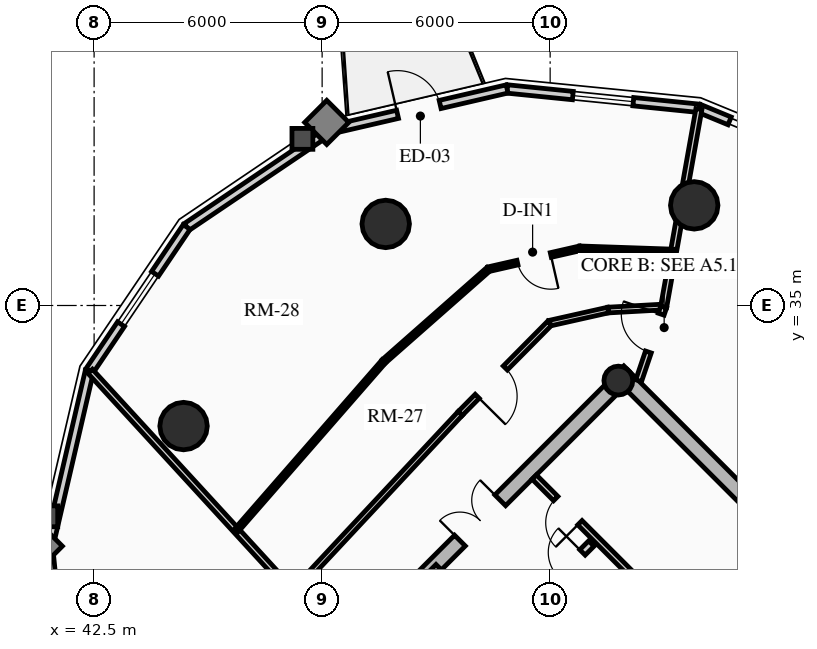
"""IFC4 building model, lengths in metres.
Left out: names, types, materials, properties, quantities, classifications, styles, units other than length and angle.
Written with IfcOpenShell. Run it as: python <this file> out.ifc"""

import sys

from ifc_helpers import new_model, si_unit, direction, frame, frame_2d, origin, origin_2d, place, context, subcontext, project, spatial, rectangle, circle, hollow_circle, extrude, source, transform, mapped, element, fill, save


model = new_model("IFC4")
c1 = context("Model", 3, precision=1e-05, world=origin(), true_north=direction((0.0, 1.0)))
c2 = subcontext(c1, "Body", "Model", "MODEL_VIEW")
j1 = project(units=[si_unit("LENGTHUNIT", "METRE"), si_unit("PLANEANGLEUNIT", "RADIAN")], contexts=[c1])
p1 = place(None, origin())
s1 = spatial("IfcSite", under=j1, at=p1, CompositionType="ELEMENT")
p2 = place(p1, origin())
s2 = spatial("IfcBuilding", under=s1, at=p2, CompositionType="ELEMENT")
p3 = place(p2, frame((0.0, 0.0, 160.33)))
s3 = spatial("IfcBuildingStorey", under=s2, at=p3, CompositionType="ELEMENT", Elevation=160.33)
p4 = place(p3, frame((66.268, 23.298, 0.0), z_axis=(0.0, 0.0, 1.0), x_axis=(-0.707106781187, 0.707106781187, 0.0)))
e1 = element("IfcWall", 1, at=p4, inside=s3, PredefinedType="SHEAR", context=c2, shape_type="SweptSolid", body=[
    extrude(rectangle(XDim=14.1, YDim=0.4, at=frame_2d((7.05, 0.0))), origin(), (0.0, 0.0, 1.0), 2.91),
])
p5 = place(p3, frame((48.873, 25.561, 0.0), z_axis=(0.0, 0.0, 1.0), x_axis=(0.707106781187, 0.707106781187, 0.0)))
e2 = element("IfcWall", 2, at=p5, inside=s3, PredefinedType="SHEAR", context=c2, shape_type="SweptSolid", body=[
    extrude(rectangle(XDim=10.7, YDim=0.4, at=frame_2d((5.35, 0.0))), origin(), (0.0, 0.0, 1.0), 2.91),
])
m1 = source(origin(), c2, "Body", "SweptSolid", [
    extrude(rectangle(XDim=1.5, YDim=2.02, at=frame_2d((0.75, 1.01))), frame((0.0, 0.21, 0.0), z_axis=(0.0, -1.0, 0.0), x_axis=(1.0, 0.0, 0.0)), (0.0, 0.0, 1.0), 0.42),
])
p6 = place(p5, frame((4.6, 0.0, 0.0)))
e3 = element("IfcOpeningElement", 3, at=p6, cuts=e2, PredefinedType="OPENING", context=c2, shape_type="MappedRepresentation", body=[
    mapped(m1, transform((0.0, 0.0, 0.0), x_axis=(1.0, 0.0, 0.0), y_axis=(0.0, 1.0, 0.0), z_axis=(0.0, 0.0, 1.0), scale=1.0)),
])
p7 = place(p3, frame((61.06, 18.373, 0.0), z_axis=(0.0, 0.0, 1.0), x_axis=(-0.707106781187, 0.707106781187, 0.0)))
e4 = element("IfcWall", 4, at=p7, inside=s3, PredefinedType="SHEAR", context=c2, shape_type="SweptSolid", body=[
    extrude(rectangle(XDim=13.7, YDim=0.35, at=frame_2d((6.85, 0.0))), origin(), (0.0, 0.0, 1.0), 2.91),
])
m2 = source(origin(), c2, "Body", "SweptSolid", [
    extrude(rectangle(XDim=1.1, YDim=2.015, at=frame_2d((0.55, 1.007))), frame((0.0, 0.185, 0.0), z_axis=(0.0, -1.0, 0.0), x_axis=(1.0, 0.0, 0.0)), (0.0, 0.0, 1.0), 0.37),
])
p8 = place(p7, frame((4.85, 0.0, 0.0)))
e5 = element("IfcOpeningElement", 5, at=p8, cuts=e4, PredefinedType="OPENING", context=c2, shape_type="MappedRepresentation", body=[
    mapped(m2, transform((0.0, 0.0, 0.0), x_axis=(1.0, 0.0, 0.0), y_axis=(0.0, 1.0, 0.0), z_axis=(0.0, 0.0, 1.0), scale=1.0)),
])
p9 = place(p7, frame((0.625, 0.0, 0.0)))
e6 = element("IfcOpeningElement", 6, at=p9, cuts=e4, PredefinedType="OPENING", context=c2, shape_type="MappedRepresentation", body=[
    mapped(m2, transform((0.0, 0.0, 0.0), x_axis=(1.0, 0.0, 0.0), y_axis=(0.0, 1.0, 0.0), z_axis=(0.0, 0.0, 1.0), scale=1.0)),
])
p10 = place(p7, frame((2.625, 0.0, 0.0)))
e7 = element("IfcOpeningElement", 7, at=p10, cuts=e4, PredefinedType="OPENING", context=c2, shape_type="MappedRepresentation", body=[
    mapped(m2, transform((0.0, 0.0, 0.0), x_axis=(1.0, 0.0, 0.0), y_axis=(0.0, 1.0, 0.0), z_axis=(0.0, 0.0, 1.0), scale=1.0)),
])
m3 = source(origin(), c2, "Body", "SweptSolid", [
    extrude(rectangle(XDim=1.15, YDim=2.02, at=frame_2d((0.575, 1.01))), frame((0.0, 0.185, 0.0), z_axis=(0.0, -1.0, 0.0), x_axis=(1.0, 0.0, 0.0)), (0.0, 0.0, 1.0), 0.37),
])
p11 = place(p7, frame((7.27, 0.0, 0.0)))
e8 = element("IfcOpeningElement", 8, at=p11, cuts=e4, PredefinedType="OPENING", context=c2, shape_type="MappedRepresentation", body=[
    mapped(m3, transform((0.0, 0.0, 0.0), x_axis=(1.0, 0.0, 0.0), y_axis=(0.0, 1.0, 0.0), z_axis=(0.0, 0.0, 1.0), scale=1.0)),
])
p12 = place(p3, frame((58.893, 25.674, 0.0), z_axis=(0.0, 0.0, 1.0), x_axis=(0.707106781187, 0.707106781187, 0.0)))
e9 = element("IfcWall", 9, at=p12, inside=s3, PredefinedType="SHEAR", context=c2, shape_type="SweptSolid", body=[
    extrude(rectangle(XDim=3.285, YDim=0.35, at=frame_2d((1.643, 0.0))), origin(), (0.0, 0.0, 1.0), 2.91),
])
p13 = place(p3, frame((56.294, 33.024, 0.0), z_axis=(0.0, 0.0, 1.0), x_axis=(0.707106781187, 0.707106781187, 0.0)))
e10 = element("IfcColumn", 10, at=p13, inside=s3, PredefinedType="COLUMN", context=c2, shape_type="SweptSolid", body=[
    extrude(hollow_circle(Radius=0.38, WallThickness=0.032, at=origin_2d()), origin(), (0.0, 0.0, 1.0), 2.91),
])
for number, where, z_axis, x_axis in (
    (11, (58.291, 37.635, 0.0), (0.0, 0.0, 1.0), (1.0, 0.0, 0.0)),
    (12, (50.173, 37.146, 0.0), (0.0, 0.0, 1.0), (1.0, 0.0, 0.0)),
    (13, (44.854, 31.827, 0.0), (0.0, 0.0, 1.0), (1.0, 0.0, 0.0)),
):
    element("IfcColumn", number, at=place(p3, frame(where, z_axis=z_axis, x_axis=x_axis)), inside=s3, PredefinedType="USERDEFINED", context=c2, shape_type="SweptSolid", body=[
        extrude(circle(Radius=0.625, at=origin_2d()), origin(), (0.0, 0.0, 1.0), 2.91),
    ])
p14 = place(p3, frame((58.418, 40.189, 0.0), z_axis=(0.0, 0.0, 1.0), x_axis=(0.924556017656, -0.381046152345, 0.0)))
e14 = element("IfcWall", 14, at=p14, inside=s3, PredefinedType="SOLIDWALL", context=c2, shape_type="SweptSolid", body=[
    extrude(rectangle(XDim=0.87, YDim=0.22, at=frame_2d((0.435, 0.0))), origin(), (0.0, 0.0, 1.0), 2.245),
])
p15 = place(p3, frame((53.367, 40.698, 0.0), z_axis=(0.0, 0.0, 1.0), x_axis=(0.994959267396, -0.100279889424, 0.0)))
e15 = element("IfcWall", 15, at=p15, inside=s3, PredefinedType="SOLIDWALL", context=c2, shape_type="SweptSolid", body=[
    extrude(rectangle(XDim=5.076, YDim=0.22, at=frame_2d((2.538, 0.0))), origin(), (0.0, 0.0, 1.0), 2.245),
])
m4 = source(origin(), c2, "Body", "SweptSolid", [
    extrude(rectangle(XDim=1.6, YDim=1.3, at=frame_2d((0.8, 0.65))), frame((0.0, 0.12, 0.0), z_axis=(0.0, -1.0, 0.0), x_axis=(1.0, 0.0, 0.0)), (0.0, 0.0, 1.0), 0.24),
])
p16 = place(p15, frame((1.738, 0.0, 0.65)))
e16 = element("IfcOpeningElement", 16, at=p16, cuts=e15, PredefinedType="OPENING", context=c2, shape_type="MappedRepresentation", body=[
    mapped(m4, transform((0.0, 0.0, 0.0), x_axis=(1.0, 0.0, 0.0), y_axis=(0.0, 1.0, 0.0), z_axis=(0.0, 0.0, 1.0), scale=1.0)),
])
p17 = place(p3, frame((48.721, 39.622, 0.0), z_axis=(0.0, 0.0, 1.0), x_axis=(0.974206226622, 0.225659540039, 0.0)))
e17 = element("IfcWall", 17, at=p17, inside=s3, PredefinedType="SOLIDWALL", context=c2, shape_type="SweptSolid", body=[
    extrude(rectangle(XDim=4.769, YDim=0.22, at=frame_2d((2.385, 0.0))), origin(), (0.0, 0.0, 1.0), 2.245),
])
m5 = source(origin(), c2, "Body", "SweptSolid", [
    extrude(rectangle(XDim=1.15, YDim=2.005, at=frame_2d((0.575, 1.002))), frame((0.0, 0.12, 0.0), z_axis=(0.0, -1.0, 0.0), x_axis=(1.0, 0.0, 0.0)), (0.0, 0.0, 1.0), 0.24),
])
p18 = place(p17, frame((1.81, 0.0, 0.0)))
e18 = element("IfcOpeningElement", 18, at=p18, cuts=e17, PredefinedType="OPENING", context=c2, shape_type="MappedRepresentation", body=[
    mapped(m5, transform((0.0, 0.0, 0.0), x_axis=(1.0, 0.0, 0.0), y_axis=(0.0, 1.0, 0.0), z_axis=(0.0, 0.0, 1.0), scale=1.0)),
])
p19 = place(p3, frame((44.935, 37.065, 0.0), z_axis=(0.0, 0.0, 1.0), x_axis=(0.828739009952, 0.559635286042, 0.0)))
e19 = element("IfcWall", 19, at=p19, inside=s3, PredefinedType="SOLIDWALL", context=c2, shape_type="SweptSolid", body=[
    extrude(rectangle(XDim=4.569, YDim=0.22, at=frame_2d((2.284, 0.0))), origin(), (0.0, 0.0, 1.0), 2.245),
])
p20 = place(p3, frame((42.378, 33.279, 0.0), z_axis=(0.0, 0.0, 1.0), x_axis=(0.559635286042, 0.828739009952, 0.0)))
e20 = element("IfcWall", 20, at=p20, inside=s3, PredefinedType="SOLIDWALL", context=c2, shape_type="SweptSolid", body=[
    extrude(rectangle(XDim=4.569, YDim=0.22, at=frame_2d((2.284, 0.0))), origin(), (0.0, 0.0, 1.0), 2.245),
])
p21 = place(p20, frame((1.484, 0.0, 0.65)))
e21 = element("IfcOpeningElement", 21, at=p21, cuts=e20, PredefinedType="OPENING", context=c2, shape_type="MappedRepresentation", body=[
    mapped(m4, transform((0.0, 0.0, 0.0), x_axis=(1.0, 0.0, 0.0), y_axis=(0.0, 1.0, 0.0), z_axis=(0.0, 0.0, 1.0), scale=1.0)),
])
p22 = place(p3, frame((41.302, 28.633, 0.0), z_axis=(0.0, 0.0, 1.0), x_axis=(0.225659540039, 0.974206226622, 0.0)))
e22 = element("IfcWall", 22, at=p22, inside=s3, PredefinedType="SOLIDWALL", context=c2, shape_type="SweptSolid", body=[
    extrude(rectangle(XDim=4.769, YDim=0.22, at=frame_2d((2.385, 0.0))), origin(), (0.0, 0.0, 1.0), 2.245),
])
p23 = place(p3, frame((41.811, 23.582, 0.0), z_axis=(0.0, 0.0, 1.0), x_axis=(-0.100279889424, 0.994959267396, 0.0)))
e23 = element("IfcWall", 23, at=p23, inside=s3, PredefinedType="SOLIDWALL", context=c2, shape_type="SweptSolid", body=[
    extrude(rectangle(XDim=5.076, YDim=0.22, at=frame_2d((2.538, 0.0))), origin(), (0.0, 0.0, 1.0), 2.245),
])
p24 = place(p23, frame((1.738, 0.0, 0.65)))
e24 = element("IfcOpeningElement", 24, at=p24, cuts=e23, PredefinedType="OPENING", context=c2, shape_type="MappedRepresentation", body=[
    mapped(m4, transform((0.0, 0.0, 0.0), x_axis=(1.0, 0.0, 0.0), y_axis=(0.0, 1.0, 0.0), z_axis=(0.0, 0.0, 1.0), scale=1.0)),
])
p25 = place(p3, frame((53.264, 26.416, 0.0), z_axis=(0.0, 0.0, 1.0), x_axis=(0.707106781187, 0.707106781187, 0.0)))
e25 = element("IfcWall", 25, at=p25, inside=s3, PredefinedType="PARTITIONING", context=c2, shape_type="SweptSolid", body=[
    extrude(rectangle(XDim=3.28, YDim=0.2, at=frame_2d((1.64, 0.0))), origin(), (0.0, 0.0, 1.0), 2.675),
])
m6 = source(origin(), c2, "Body", "SweptSolid", [
    extrude(rectangle(XDim=1.0, YDim=2.015, at=frame_2d((0.5, 1.007))), frame((0.0, 0.11, 0.0), z_axis=(0.0, -1.0, 0.0), x_axis=(1.0, 0.0, 0.0)), (0.0, 0.0, 1.0), 0.22),
])
p26 = place(p25, frame((0.14, 0.0, 0.0)))
e26 = element("IfcOpeningElement", 26, at=p26, cuts=e25, PredefinedType="OPENING", context=c2, shape_type="MappedRepresentation", body=[
    mapped(m6, transform((0.0, 0.0, 0.0), x_axis=(1.0, 0.0, 0.0), y_axis=(0.0, 1.0, 0.0), z_axis=(0.0, 0.0, 1.0), scale=1.0)),
])
m7 = source(origin(), c2, "Body", "SweptSolid", [
    extrude(rectangle(XDim=0.9, YDim=2.005, at=frame_2d((0.45, 1.002))), frame((0.0, 0.11, 0.0), z_axis=(0.0, -1.0, 0.0), x_axis=(1.0, 0.0, 0.0)), (0.0, 0.0, 1.0), 0.22),
])
p27 = place(p25, frame((2.05, 0.0, 0.0)))
e27 = element("IfcOpeningElement", 27, at=p27, cuts=e25, PredefinedType="OPENING", context=c2, shape_type="MappedRepresentation", body=[
    mapped(m7, transform((0.0, 0.0, 0.0), x_axis=(1.0, 0.0, 0.0), y_axis=(0.0, 1.0, 0.0), z_axis=(0.0, 0.0, 1.0), scale=1.0)),
])
p28 = place(p3, frame((56.839, 27.728, 0.0), z_axis=(0.0, 0.0, 1.0), x_axis=(-0.707106781187, 0.707106781187, 0.0)))
e28 = element("IfcWall", 28, at=p28, inside=s3, PredefinedType="PARTITIONING", context=c2, shape_type="SweptSolid", body=[
    extrude(rectangle(XDim=3.9, YDim=0.16, at=frame_2d((1.95, 0.0))), origin(), (0.0, 0.0, 1.0), 2.675),
])
m8 = source(origin(), c2, "Body", "SweptSolid", [
    extrude(rectangle(XDim=0.9, YDim=2.005, at=frame_2d((0.45, 1.002))), frame((0.0, 0.09, 0.0), z_axis=(0.0, -1.0, 0.0), x_axis=(1.0, 0.0, 0.0)), (0.0, 0.0, 1.0), 0.18),
])
p29 = place(p28, frame((2.2, 0.0, 0.0)))
e29 = element("IfcOpeningElement", 29, at=p29, cuts=e28, PredefinedType="OPENING", context=c2, shape_type="MappedRepresentation", body=[
    mapped(m8, transform((0.0, 0.0, 0.0), x_axis=(1.0, 0.0, 0.0), y_axis=(0.0, 1.0, 0.0), z_axis=(0.0, 0.0, 1.0), scale=1.0)),
])
p30 = place(p3, frame((57.486, 34.96, 0.0), z_axis=(0.0, 0.0, 1.0), x_axis=(-0.998483871836, -0.055045051404, 0.0)))
e30 = element("IfcWall", 30, at=p30, inside=s3, PredefinedType="PARTITIONING", context=c2, shape_type="SweptSolid", body=[
    extrude(rectangle(XDim=1.464, YDim=0.15, at=frame_2d((0.732, 0.0))), origin(), (0.0, 0.0, 1.0), 2.245),
])
p31 = place(p3, frame((56.025, 34.88, 0.0), z_axis=(0.0, 0.0, 1.0), x_axis=(-0.975729093394, -0.218981132301, 0.0)))
e31 = element("IfcWall", 31, at=p31, inside=s3, PredefinedType="PARTITIONING", context=c2, shape_type="SweptSolid", body=[
    extrude(rectangle(XDim=1.575, YDim=0.15, at=frame_2d((0.788, 0.0))), origin(), (0.0, 0.0, 1.0), 2.245),
])
p32 = place(p3, frame((54.488, 34.535, 0.0), z_axis=(0.0, 0.0, 1.0), x_axis=(-0.703666289339, -0.710530613871, 0.0)))
e32 = element("IfcWall", 32, at=p32, inside=s3, PredefinedType="PARTITIONING", context=c2, shape_type="SweptSolid", body=[
    extrude(rectangle(XDim=3.343, YDim=0.15, at=frame_2d((1.672, 0.0))), origin(), (0.0, 0.0, 1.0), 2.245),
])
m9 = source(origin(), c2, "Body", "SweptSolid", [
    extrude(rectangle(XDim=1.05, YDim=2.015, at=frame_2d((0.525, 1.007))), frame((0.0, 0.085, 0.0), z_axis=(0.0, -1.0, 0.0), x_axis=(1.0, 0.0, 0.0)), (0.0, 0.0, 1.0), 0.17),
])
p33 = place(p32, frame((1.66, 0.0, 0.0)))
e33 = element("IfcOpeningElement", 33, at=p33, cuts=e32, PredefinedType="OPENING", context=c2, shape_type="MappedRepresentation", body=[
    mapped(m9, transform((0.0, 0.0, 0.0), x_axis=(1.0, 0.0, 0.0), y_axis=(0.0, 1.0, 0.0), z_axis=(0.0, 0.0, 1.0), scale=1.0)),
])
p34 = place(p3, frame((52.135, 32.159, 0.0), z_axis=(0.0, 0.0, 1.0), x_axis=(-0.682546302454, -0.730842353047, 0.0)))
e34 = element("IfcWall", 34, at=p34, inside=s3, PredefinedType="PARTITIONING", context=c2, shape_type="SweptSolid", body=[
    extrude(rectangle(XDim=6.445, YDim=0.15, at=frame_2d((3.223, 0.0))), origin(), (0.0, 0.0, 1.0), 2.245),
])
p35 = place(p3, frame((57.486, 34.96, 0.0), z_axis=(0.0, 0.0, 1.0), x_axis=(0.175432895983, 0.984491391027, 0.0)))
e35 = element("IfcWall", 35, at=p35, inside=s3, PredefinedType="PARTITIONING", context=c2, shape_type="SweptSolid", body=[
    extrude(rectangle(XDim=5.291, YDim=0.16, at=frame_2d((2.646, 0.0))), origin(), (0.0, 0.0, 1.0), 2.245),
])
p36 = place(p3, frame((47.736, 27.449, 0.0), z_axis=(0.0, 0.0, 1.0), x_axis=(-0.676056254668, 0.736850012231, 0.0)))
e36 = element("IfcWall", 36, at=p36, inside=s3, PredefinedType="PARTITIONING", context=c2, shape_type="SweptSolid", body=[
    extrude(rectangle(XDim=7.899, YDim=0.16, at=frame_2d((3.95, 0.0))), origin(), (0.0, 0.0, 1.0), 2.245),
])
p37 = place(p3, frame((56.828, 33.021, 0.0), z_axis=(0.0, 0.0, 1.0), x_axis=(0.321300161671, 0.94697740528, 0.0)))
e37 = element("IfcWall", 37, at=p37, inside=s3, PredefinedType="PARTITIONING", context=c2, shape_type="SweptSolid", body=[
    extrude(rectangle(XDim=2.049, YDim=0.16, at=frame_2d((1.024, 0.0))), origin(), (0.0, 0.0, 1.0), 2.245),
])
m10 = source(origin(), c2, "Body", "SweptSolid", [
    extrude(rectangle(XDim=1.05, YDim=2.015, at=frame_2d((0.525, 1.007))), frame((0.0, 0.09, 0.0), z_axis=(0.0, -1.0, 0.0), x_axis=(1.0, 0.0, 0.0)), (0.0, 0.0, 1.0), 0.18),
])
p38 = place(p37, frame((0.798, 0.0, 0.0)))
e38 = element("IfcOpeningElement", 38, at=p38, cuts=e37, PredefinedType="OPENING", context=c2, shape_type="MappedRepresentation", body=[
    mapped(m10, transform((0.0, 0.0, 0.0), x_axis=(1.0, 0.0, 0.0), y_axis=(0.0, 1.0, 0.0), z_axis=(0.0, 0.0, 1.0), scale=1.0)),
])
p39 = place(p3, frame((57.746, 36.419, 0.0), z_axis=(0.0, 0.0, 1.0), x_axis=(-0.999409872703, 0.03434976484, 0.0)))
e39 = element("IfcWall", 39, at=p39, inside=s3, PredefinedType="PARTITIONING", context=c2, shape_type="SweptSolid", body=[
    extrude(rectangle(XDim=2.466, YDim=0.125, at=frame_2d((1.233, 0.0))), origin(), (0.0, 0.0, 1.0), 2.245),
])
p40 = place(p3, frame((55.281, 36.504, 0.0), z_axis=(0.0, 0.0, 1.0), x_axis=(-0.974908832019, -0.222604513096, 0.0)))
e40 = element("IfcWall", 40, at=p40, inside=s3, PredefinedType="PARTITIONING", context=c2, shape_type="SweptSolid", body=[
    extrude(rectangle(XDim=2.468, YDim=0.125, at=frame_2d((1.234, 0.0))), origin(), (0.0, 0.0, 1.0), 2.245),
])
m11 = source(origin(), c2, "Body", "SweptSolid", [
    extrude(rectangle(XDim=0.9, YDim=2.005, at=frame_2d((0.45, 1.002))), frame((0.0, 0.073, 0.0), z_axis=(0.0, -1.0, 0.0), x_axis=(1.0, 0.0, 0.0)), (0.0, 0.0, 1.0), 0.145),
])
p41 = place(p40, frame((0.784, 0.0, 0.0)))
e41 = element("IfcOpeningElement", 41, at=p41, cuts=e40, PredefinedType="OPENING", context=c2, shape_type="MappedRepresentation", body=[
    mapped(m11, transform((0.0, 0.0, 0.0), x_axis=(1.0, 0.0, 0.0), y_axis=(0.0, 1.0, 0.0), z_axis=(0.0, 0.0, 1.0), scale=1.0)),
])
p42 = place(p3, frame((52.876, 35.954, 0.0), z_axis=(0.0, 0.0, 1.0), x_axis=(-0.750317340408, -0.661077823469, 0.0)))
e42 = element("IfcWall", 42, at=p42, inside=s3, PredefinedType="PARTITIONING", context=c2, shape_type="SweptSolid", body=[
    extrude(rectangle(XDim=3.669, YDim=0.125, at=frame_2d((1.834, 0.0))), origin(), (0.0, 0.0, 1.0), 2.245),
])
p43 = place(p3, frame((50.123, 33.529, 0.0), z_axis=(0.0, 0.0, 1.0), x_axis=(-0.657371249324, -0.753566878626, 0.0)))
e43 = element("IfcWall", 43, at=p43, inside=s3, PredefinedType="PARTITIONING", context=c2, shape_type="SweptSolid", body=[
    extrude(rectangle(XDim=5.906, YDim=0.125, at=frame_2d((2.953, 0.0))), origin(), (0.0, 0.0, 1.0), 2.245),
])
m12 = source(origin(), c2, "Body", "SweptSolid", [
    extrude(rectangle(XDim=1.6, YDim=1.3, at=frame_2d((0.8, 0.65))), frame((0.0, 0.03, 0.0), z_axis=(0.0, -1.0, 0.0), x_axis=(1.0, 0.0, 0.0)), (0.0, 0.0, 1.0), 0.06),
])
p44 = place(p16, origin())
e44 = element("IfcWindow", 44, at=p44, inside=s3, PartitioningType="SINGLE_PANEL", PredefinedType="WINDOW", context=c2, shape_type="MappedRepresentation", body=[
    mapped(m12, transform((0.0, 0.0, 0.0), x_axis=(1.0, 0.0, 0.0), y_axis=(0.0, 1.0, 0.0), z_axis=(0.0, 0.0, 1.0), scale=1.0)),
])
fill(e16, e44)
m13 = source(origin(), c2, "Body", "SweptSolid", [
    extrude(rectangle(XDim=1.15, YDim=2.005, at=frame_2d((0.575, 1.002))), frame((0.0, 0.025, 0.0), z_axis=(0.0, -1.0, 0.0), x_axis=(1.0, 0.0, 0.0)), (0.0, 0.0, 1.0), 0.05),
])
p45 = place(p18, origin())
e45 = element("IfcDoor", 45, at=p45, inside=s3, OperationType="SINGLE_SWING_LEFT", PredefinedType="DOOR", context=c2, shape_type="MappedRepresentation", body=[
    mapped(m13, transform((0.0, 0.0, 0.0), x_axis=(1.0, 0.0, 0.0), y_axis=(0.0, 1.0, 0.0), z_axis=(0.0, 0.0, 1.0), scale=1.0)),
])
fill(e18, e45)
p46 = place(p21, origin())
e46 = element("IfcWindow", 46, at=p46, inside=s3, PartitioningType="SINGLE_PANEL", PredefinedType="WINDOW", context=c2, shape_type="MappedRepresentation", body=[
    mapped(m12, transform((0.0, 0.0, 0.0), x_axis=(1.0, 0.0, 0.0), y_axis=(0.0, 1.0, 0.0), z_axis=(0.0, 0.0, 1.0), scale=1.0)),
])
fill(e21, e46)
m14 = source(origin(), c2, "Body", "SweptSolid", [
    extrude(rectangle(XDim=1.5, YDim=2.02, at=frame_2d((0.75, 1.01))), frame((0.0, 0.025, 0.0), z_axis=(0.0, -1.0, 0.0), x_axis=(1.0, 0.0, 0.0)), (0.0, 0.0, 1.0), 0.05),
])
p47 = place(p6, origin())
e47 = element("IfcDoor", 47, at=p47, inside=s3, OperationType="DOUBLE_DOOR_SINGLE_SWING", PredefinedType="DOOR", context=c2, shape_type="MappedRepresentation", body=[
    mapped(m14, transform((0.0, 0.0, 0.0), x_axis=(1.0, 0.0, 0.0), y_axis=(0.0, 1.0, 0.0), z_axis=(0.0, 0.0, 1.0), scale=1.0)),
])
fill(e3, e47)
m15 = source(origin(), c2, "Body", "SweptSolid", [
    extrude(rectangle(XDim=0.9, YDim=2.005, at=frame_2d((0.45, 1.002))), frame((0.0, 0.025, 0.0), z_axis=(0.0, -1.0, 0.0), x_axis=(1.0, 0.0, 0.0)), (0.0, 0.0, 1.0), 0.05),
])
p48 = place(p27, origin())
e48 = element("IfcDoor", 48, at=p48, inside=s3, OperationType="SINGLE_SWING_RIGHT", PredefinedType="DOOR", context=c2, shape_type="MappedRepresentation", body=[
    mapped(m15, transform((0.0, 0.0, 0.0), x_axis=(1.0, 0.0, 0.0), y_axis=(0.0, 1.0, 0.0), z_axis=(0.0, 0.0, 1.0), scale=1.0)),
])
fill(e27, e48)
p49 = place(p29, origin())
e49 = element("IfcDoor", 49, at=p49, inside=s3, OperationType="SINGLE_SWING_LEFT", PredefinedType="DOOR", context=c2, shape_type="MappedRepresentation", body=[
    mapped(m15, transform((0.0, 0.0, 0.0), x_axis=(1.0, 0.0, 0.0), y_axis=(0.0, 1.0, 0.0), z_axis=(0.0, 0.0, 1.0), scale=1.0)),
])
fill(e29, e49)
m16 = source(origin(), c2, "Body", "SweptSolid", [
    extrude(rectangle(XDim=1.05, YDim=2.015, at=frame_2d((0.525, 1.007))), frame((0.0, 0.025, 0.0), z_axis=(0.0, -1.0, 0.0), x_axis=(1.0, 0.0, 0.0)), (0.0, 0.0, 1.0), 0.05),
])
p50 = place(p38, origin())
e50 = element("IfcDoor", 50, at=p50, inside=s3, OperationType="SINGLE_SWING_RIGHT", PredefinedType="DOOR", context=c2, shape_type="MappedRepresentation", body=[
    mapped(m16, transform((0.0, 0.0, 0.0), x_axis=(1.0, 0.0, 0.0), y_axis=(0.0, 1.0, 0.0), z_axis=(0.0, 0.0, 1.0), scale=1.0)),
])
fill(e38, e50)
p51 = place(p33, origin())
e51 = element("IfcDoor", 51, at=p51, inside=s3, OperationType="SINGLE_SWING_RIGHT", PredefinedType="DOOR", context=c2, shape_type="MappedRepresentation", body=[
    mapped(m16, transform((0.0, 0.0, 0.0), x_axis=(1.0, 0.0, 0.0), y_axis=(0.0, 1.0, 0.0), z_axis=(0.0, 0.0, 1.0), scale=1.0)),
])
fill(e33, e51)
p52 = place(p41, origin())
e52 = element("IfcDoor", 52, at=p52, inside=s3, OperationType="SINGLE_SWING_LEFT", PredefinedType="DOOR", context=c2, shape_type="MappedRepresentation", body=[
    mapped(m15, transform((0.0, 0.0, 0.0), x_axis=(1.0, 0.0, 0.0), y_axis=(0.0, 1.0, 0.0), z_axis=(0.0, 0.0, 1.0), scale=1.0)),
])
fill(e41, e52)
save(model, sys.argv[1])
